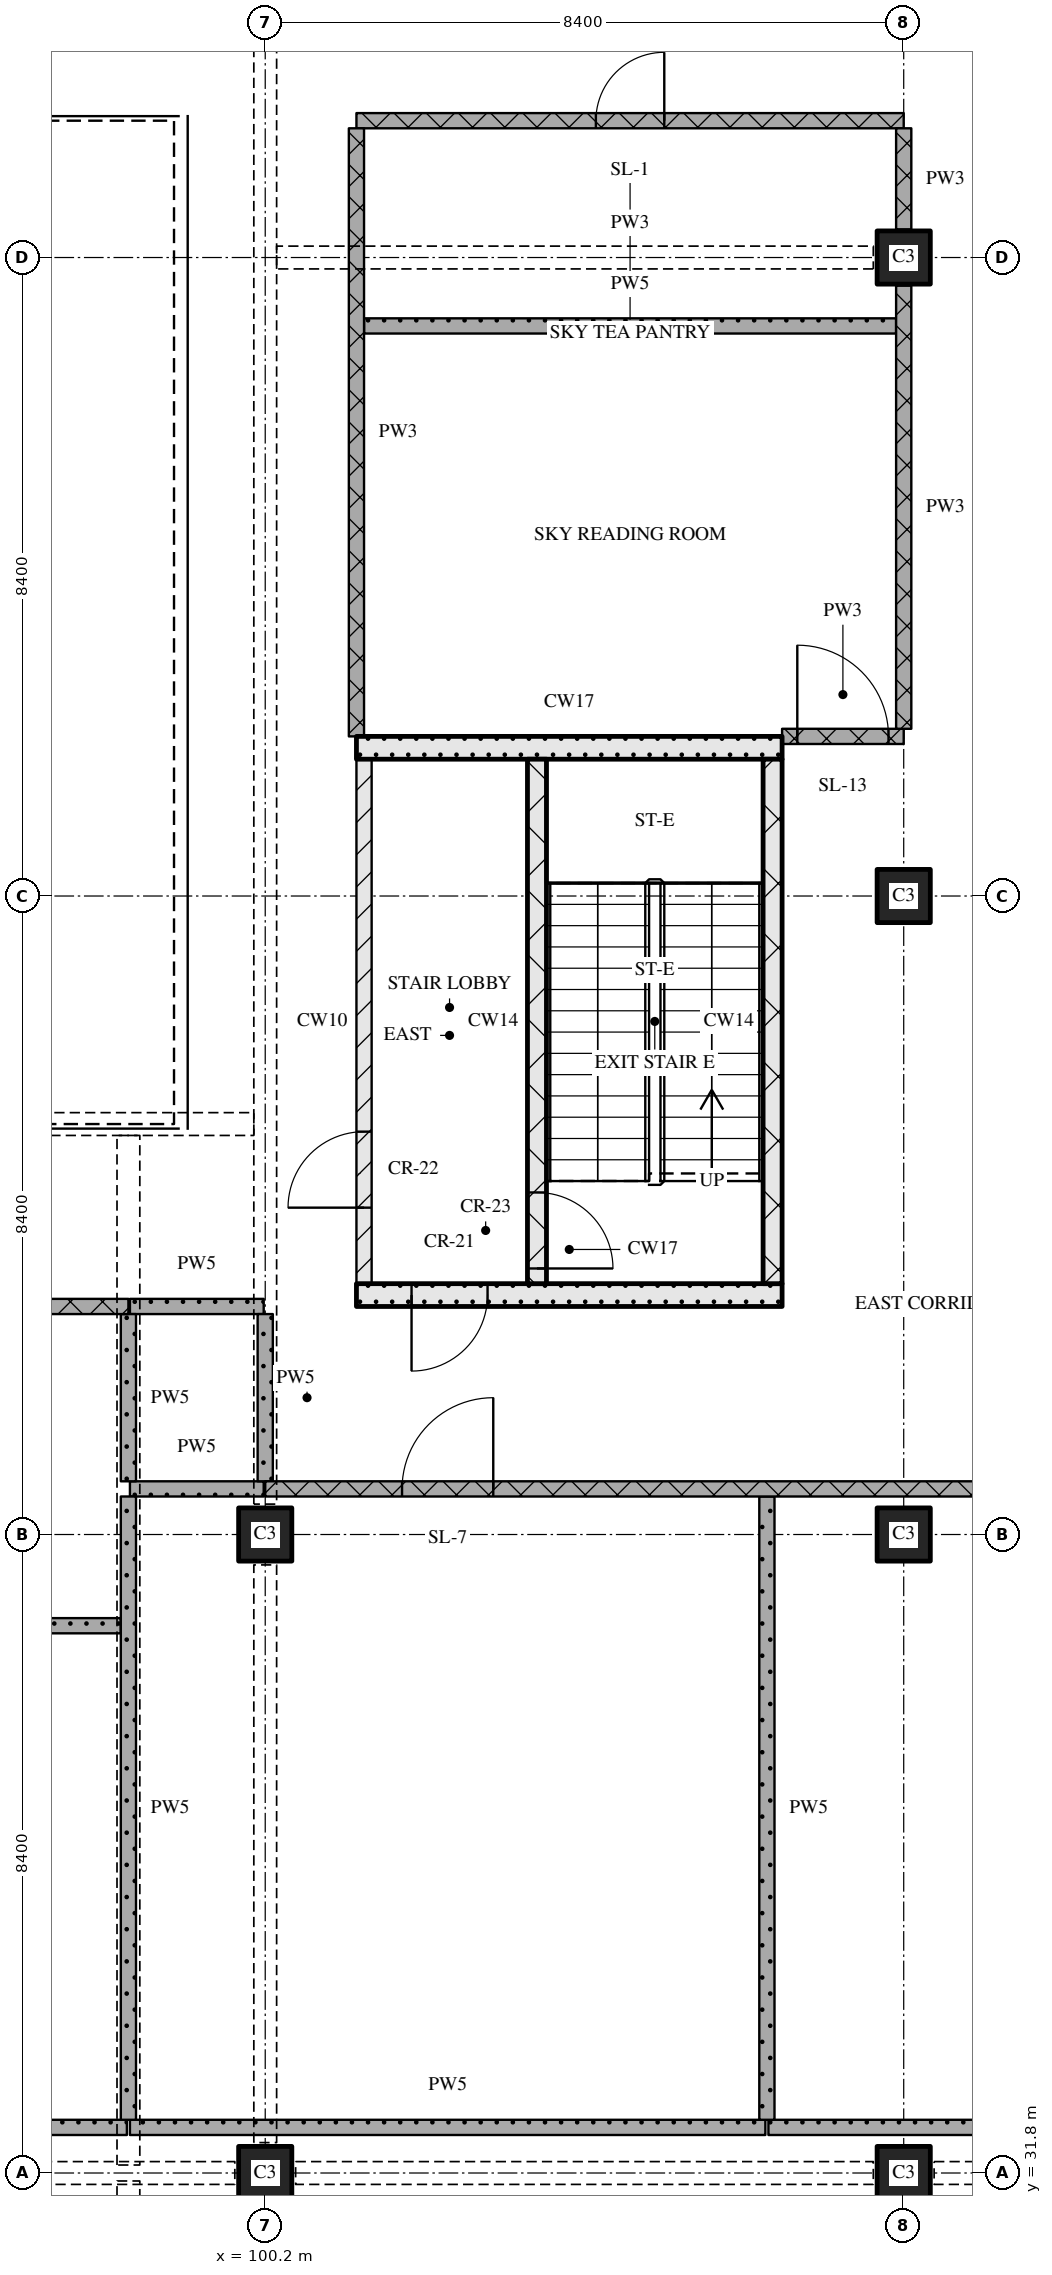
"""IFC4 building model, lengths in metres.
Left out: names, types, materials, properties, quantities, classifications, styles, units other than length and angle.
Written with IfcOpenShell. Run it as: python <this file> out.ifc"""

import sys

from ifc_helpers import new_model, si_unit, direction, frame, frame_2d, origin, origin_2d, place, context, subcontext, project, spatial, rectangle, extrude, element, fill, save


model = new_model("IFC4")
c1 = context("Model", 3, precision=1e-05, world=origin(), true_north=direction((0.0, 1.0)))
c2 = subcontext(c1, "Body", "Model", "MODEL_VIEW")
j1 = project(units=[si_unit("LENGTHUNIT", "METRE"), si_unit("PLANEANGLEUNIT", "RADIAN")], contexts=[c1])
p1 = place(None, origin())
s1 = spatial("IfcSite", under=j1, at=p1, CompositionType="ELEMENT")
p2 = place(p1, origin())
s2 = spatial("IfcBuilding", under=s1, at=p2, CompositionType="ELEMENT")
p3 = place(p2, frame((0.0, 0.0, 142.05)))
s3 = spatial("IfcBuildingStorey", under=s2, at=p3, CompositionType="ELEMENT", Elevation=142.05)
for number, where, z_axis, x_axis in (
    (1, (100.2, 31.8, 0.0), (0.0, 0.0, 1.0), (1.0, 0.0, 0.0)),
    (2, (100.2, 40.2, 0.0), (0.0, 0.0, 1.0), (1.0, 0.0, 0.0)),
    (3, (108.6, 31.8, 0.0), (0.0, 0.0, 1.0), (1.0, 0.0, 0.0)),
    (4, (108.6, 40.2, 0.0), (0.0, 0.0, 1.0), (1.0, 0.0, 0.0)),
    (5, (108.6, 48.6, 0.0), (0.0, 0.0, 1.0), (1.0, 0.0, 0.0)),
    (6, (108.6, 57.0, 0.0), (0.0, 0.0, 1.0), (1.0, 0.0, 0.0)),
):
    element("IfcColumn", number, at=place(p3, frame(where, z_axis=z_axis, x_axis=x_axis)), inside=s3, PredefinedType="COLUMN", context=c2, shape_type="SweptSolid", body=[
        extrude(rectangle(XDim=0.7, YDim=0.7, at=origin_2d()), origin(), (0.0, 0.0, 1.0), 5.4),
    ])
p4 = place(p3, frame((101.4, 43.35, 0.0), z_axis=(0.0, 0.0, 1.0), x_axis=(1.0, 0.0, 0.0)))
e7 = element("IfcWall", 7, at=p4, inside=s3, PredefinedType="SOLIDWALL", context=c2, shape_type="SweptSolid", body=[
    extrude(rectangle(XDim=5.6, YDim=0.3, at=frame_2d((2.8, 0.0))), origin(), (0.0, 0.0, 1.0), 5.12),
])
p5 = place(p4, frame((0.725, 0.0, 0.0)))
e8 = element("IfcOpeningElement", 8, at=p5, cuts=e7, PredefinedType="OPENING", context=c2, shape_type="SweptSolid", body=[
    extrude(rectangle(XDim=1.0, YDim=2.1, at=frame_2d((0.5, 1.05))), frame((0.0, 0.16, 0.0), z_axis=(0.0, -1.0, 0.0), x_axis=(1.0, 0.0, 0.0)), (0.0, 0.0, 1.0), 0.32),
])
p6 = place(p3, frame((101.5, 43.5, 0.0), z_axis=(0.0, 0.0, 1.0), x_axis=(0.0, 1.0, 0.0)))
e9 = element("IfcWall", 9, at=p6, inside=s3, PredefinedType="PARTITIONING", context=c2, shape_type="SweptSolid", body=[
    extrude(rectangle(XDim=6.9, YDim=0.2, at=frame_2d((3.45, 0.0))), origin(), (0.0, 0.0, 1.0), 5.12),
])
p7 = place(p6, frame((1.0, 0.0, 0.0)))
e10 = element("IfcOpeningElement", 10, at=p7, cuts=e9, PredefinedType="OPENING", context=c2, shape_type="SweptSolid", body=[
    extrude(rectangle(XDim=1.0, YDim=2.1, at=frame_2d((0.5, 1.05))), frame((0.0, 0.11, 0.0), z_axis=(0.0, -1.0, 0.0), x_axis=(1.0, 0.0, 0.0)), (0.0, 0.0, 1.0), 0.22),
])
p8 = place(p3, frame((103.775, 43.5, 0.0), z_axis=(0.0, 0.0, 1.0), x_axis=(0.0, 1.0, 0.0)))
e11 = element("IfcWall", 11, at=p8, inside=s3, PredefinedType="SOLIDWALL", context=c2, shape_type="SweptSolid", body=[
    extrude(rectangle(XDim=6.9, YDim=0.25, at=frame_2d((3.45, 0.0))), origin(), (0.0, 0.0, 1.0), 5.12),
])
p9 = place(p8, frame((0.2, 0.0, 0.0)))
e12 = element("IfcOpeningElement", 12, at=p9, cuts=e11, PredefinedType="OPENING", context=c2, shape_type="SweptSolid", body=[
    extrude(rectangle(XDim=1.0, YDim=2.1, at=frame_2d((0.5, 1.05))), frame((0.0, 0.135, 0.0), z_axis=(0.0, -1.0, 0.0), x_axis=(1.0, 0.0, 0.0)), (0.0, 0.0, 1.0), 0.27),
])
p10 = place(p3, frame((106.875, 43.5, 0.0), z_axis=(0.0, 0.0, 1.0), x_axis=(0.0, 1.0, 0.0)))
e13 = element("IfcWall", 13, at=p10, inside=s3, PredefinedType="SOLIDWALL", context=c2, shape_type="SweptSolid", body=[
    extrude(rectangle(XDim=6.9, YDim=0.25, at=frame_2d((3.45, 0.0))), origin(), (0.0, 0.0, 1.0), 5.12),
])
p11 = place(p3, frame((101.4, 50.55, 0.0), z_axis=(0.0, 0.0, 1.0), x_axis=(1.0, 0.0, 0.0)))
e14 = element("IfcWall", 14, at=p11, inside=s3, PredefinedType="SOLIDWALL", context=c2, shape_type="SweptSolid", body=[
    extrude(rectangle(XDim=5.6, YDim=0.3, at=frame_2d((2.8, 0.0))), origin(), (0.0, 0.0, 1.0), 5.12),
])
p12 = place(p3, frame((94.8, 32.4, 0.0), z_axis=(0.0, 0.0, 1.0), x_axis=(1.0, 0.0, 0.0)))
e15 = element("IfcWall", 15, at=p12, inside=s3, PredefinedType="PARTITIONING", context=c2, shape_type="SweptSolid", body=[
    extrude(rectangle(XDim=3.58, YDim=0.2, at=frame_2d((1.79, 0.0))), origin(), (0.0, 0.0, 1.0), 5.12),
])
p13 = place(p3, frame((98.42, 32.4, 0.0), z_axis=(0.0, 0.0, 1.0), x_axis=(1.0, 0.0, 0.0)))
e16 = element("IfcWall", 16, at=p13, inside=s3, PredefinedType="PARTITIONING", context=c2, shape_type="SweptSolid", body=[
    extrude(rectangle(XDim=8.36, YDim=0.2, at=frame_2d((4.18, 0.0))), origin(), (0.0, 0.0, 1.0), 5.12),
])
p14 = place(p3, frame((106.82, 32.4, 0.0), z_axis=(0.0, 0.0, 1.0), x_axis=(1.0, 0.0, 0.0)))
e17 = element("IfcWall", 17, at=p14, inside=s3, PredefinedType="PARTITIONING", context=c2, shape_type="SweptSolid", body=[
    extrude(rectangle(XDim=9.26, YDim=0.2, at=frame_2d((4.63, 0.0))), origin(), (0.0, 0.0, 1.0), 5.12),
])
p15 = place(p3, frame((98.3, 39.0, 0.0), z_axis=(0.0, 0.0, 1.0), x_axis=(-1.0, 0.0, 0.0)))
e18 = element("IfcWall", 18, at=p15, inside=s3, PredefinedType="PARTITIONING", context=c2, shape_type="SweptSolid", body=[
    extrude(rectangle(XDim=20.8, YDim=0.2, at=frame_2d((10.4, 0.0))), origin(), (0.0, 0.0, 1.0), 5.12),
])
p16 = place(p15, frame((9.8, 0.0, 0.0)))
e19 = element("IfcOpeningElement", 19, at=p16, cuts=e18, PredefinedType="OPENING", context=c2, shape_type="SweptSolid", body=[
    extrude(rectangle(XDim=1.2, YDim=2.1, at=frame_2d((0.6, 1.05))), frame((0.0, 0.11, 0.0), z_axis=(0.0, -1.0, 0.0), x_axis=(1.0, 0.0, 0.0)), (0.0, 0.0, 1.0), 0.22),
])
p17 = place(p3, frame((123.948, 40.8, 0.0), z_axis=(0.0, 0.0, 1.0), x_axis=(-1.0, 0.0, 0.0)))
e20 = element("IfcWall", 20, at=p17, inside=s3, PredefinedType="PARTITIONING", context=c2, shape_type="SweptSolid", body=[
    extrude(rectangle(XDim=23.749, YDim=0.2, at=frame_2d((11.874, 0.0))), origin(), (0.0, 0.0, 1.0), 5.12),
])
p18 = place(p17, frame((4.098, 0.0, 0.0)))
e21 = element("IfcOpeningElement", 21, at=p18, cuts=e20, PredefinedType="OPENING", context=c2, shape_type="SweptSolid", body=[
    extrude(rectangle(XDim=1.2, YDim=2.1, at=frame_2d((0.6, 1.05))), frame((0.0, 0.11, 0.0), z_axis=(0.0, -1.0, 0.0), x_axis=(1.0, 0.0, 0.0)), (0.0, 0.0, 1.0), 0.22),
])
p19 = place(p17, frame((11.497, 0.0, 0.0)))
e22 = element("IfcOpeningElement", 22, at=p19, cuts=e20, PredefinedType="OPENING", context=c2, shape_type="SweptSolid", body=[
    extrude(rectangle(XDim=1.2, YDim=2.1, at=frame_2d((0.6, 1.05))), frame((0.0, 0.11, 0.0), z_axis=(0.0, -1.0, 0.0), x_axis=(1.0, 0.0, 0.0)), (0.0, 0.0, 1.0), 0.22),
])
p20 = place(p17, frame((20.749, 0.0, 0.0)))
e23 = element("IfcOpeningElement", 23, at=p20, cuts=e20, PredefinedType="OPENING", context=c2, shape_type="SweptSolid", body=[
    extrude(rectangle(XDim=1.2, YDim=2.1, at=frame_2d((0.6, 1.05))), frame((0.0, 0.11, 0.0), z_axis=(0.0, -1.0, 0.0), x_axis=(1.0, 0.0, 0.0)), (0.0, 0.0, 1.0), 0.22),
])
p21 = place(p3, frame((98.42, 40.8, 0.0), z_axis=(0.0, 0.0, 1.0), x_axis=(1.0, 0.0, 0.0)))
e24 = element("IfcWall", 24, at=p21, inside=s3, PredefinedType="PARTITIONING", context=c2, shape_type="SweptSolid", body=[
    extrude(rectangle(XDim=1.76, YDim=0.2, at=frame_2d((0.88, 0.0))), origin(), (0.0, 0.0, 1.0), 5.12),
])
p22 = place(p3, frame((98.4, 43.2, 0.0), z_axis=(0.0, 0.0, 1.0), x_axis=(-1.0, 0.0, 0.0)))
e25 = element("IfcWall", 25, at=p22, inside=s3, PredefinedType="PARTITIONING", context=c2, shape_type="SweptSolid", body=[
    extrude(rectangle(XDim=21.0, YDim=0.2, at=frame_2d((10.5, 0.0))), origin(), (0.0, 0.0, 1.0), 5.12),
])
p23 = place(p22, frame((10.0, 0.0, 0.0)))
e26 = element("IfcOpeningElement", 26, at=p23, cuts=e25, PredefinedType="OPENING", context=c2, shape_type="SweptSolid", body=[
    extrude(rectangle(XDim=1.0, YDim=2.1, at=frame_2d((0.5, 1.05))), frame((0.0, 0.11, 0.0), z_axis=(0.0, -1.0, 0.0), x_axis=(1.0, 0.0, 0.0)), (0.0, 0.0, 1.0), 0.22),
])
p24 = place(p3, frame((98.42, 43.2, 0.0), z_axis=(0.0, 0.0, 1.0), x_axis=(1.0, 0.0, 0.0)))
e27 = element("IfcWall", 27, at=p24, inside=s3, PredefinedType="PARTITIONING", context=c2, shape_type="SweptSolid", body=[
    extrude(rectangle(XDim=1.76, YDim=0.2, at=frame_2d((0.88, 0.0))), origin(), (0.0, 0.0, 1.0), 5.12),
])
p25 = place(p3, frame((107.0, 50.7, 0.0), z_axis=(0.0, 0.0, 1.0), x_axis=(1.0, 0.0, 0.0)))
e28 = element("IfcWall", 28, at=p25, inside=s3, PredefinedType="PARTITIONING", context=c2, shape_type="SweptSolid", body=[
    extrude(rectangle(XDim=1.6, YDim=0.2, at=frame_2d((0.8, 0.0))), origin(), (0.0, 0.0, 1.0), 5.12),
])
p26 = place(p25, frame((0.2, 0.0, 0.0)))
e29 = element("IfcOpeningElement", 29, at=p26, cuts=e28, PredefinedType="OPENING", context=c2, shape_type="SweptSolid", body=[
    extrude(rectangle(XDim=1.2, YDim=2.1, at=frame_2d((0.6, 1.05))), frame((0.0, 0.11, 0.0), z_axis=(0.0, -1.0, 0.0), x_axis=(1.0, 0.0, 0.0)), (0.0, 0.0, 1.0), 0.22),
])
p27 = place(p3, frame((101.5, 56.1, 0.0), z_axis=(0.0, 0.0, 1.0), x_axis=(1.0, 0.0, 0.0)))
e30 = element("IfcWall", 30, at=p27, inside=s3, PredefinedType="PARTITIONING", context=c2, shape_type="SweptSolid", body=[
    extrude(rectangle(XDim=7.0, YDim=0.2, at=frame_2d((3.5, 0.0))), origin(), (0.0, 0.0, 1.0), 5.12),
])
p28 = place(p3, frame((108.6, 58.8, 0.0), z_axis=(0.0, 0.0, 1.0), x_axis=(-1.0, 0.0, 0.0)))
e31 = element("IfcWall", 31, at=p28, inside=s3, PredefinedType="PARTITIONING", context=c2, shape_type="SweptSolid", body=[
    extrude(rectangle(XDim=7.2, YDim=0.2, at=frame_2d((3.6, 0.0))), origin(), (0.0, 0.0, 1.0), 5.12),
])
p29 = place(p28, frame((3.15, 0.0, 0.0)))
e32 = element("IfcOpeningElement", 32, at=p29, cuts=e31, PredefinedType="OPENING", context=c2, shape_type="SweptSolid", body=[
    extrude(rectangle(XDim=0.9, YDim=2.1, at=frame_2d((0.45, 1.05))), frame((0.0, 0.11, 0.0), z_axis=(0.0, -1.0, 0.0), x_axis=(1.0, 0.0, 0.0)), (0.0, 0.0, 1.0), 0.22),
])
p30 = place(p3, frame((98.4, 43.1, 0.0), z_axis=(0.0, 0.0, 1.0), x_axis=(0.0, -1.0, 0.0)))
e33 = element("IfcWall", 33, at=p30, inside=s3, PredefinedType="PARTITIONING", context=c2, shape_type="SweptSolid", body=[
    extrude(rectangle(XDim=2.2, YDim=0.2, at=frame_2d((1.1, 0.0))), origin(), (0.0, 0.0, 1.0), 5.12),
])
p31 = place(p3, frame((98.4, 40.7, 0.0), z_axis=(0.0, 0.0, 1.0), x_axis=(0.0, -1.0, 0.0)))
e34 = element("IfcWall", 34, at=p31, inside=s3, PredefinedType="PARTITIONING", context=c2, shape_type="SweptSolid", body=[
    extrude(rectangle(XDim=8.2, YDim=0.2, at=frame_2d((4.1, 0.0))), origin(), (0.0, 0.0, 1.0), 5.12),
])
p32 = place(p3, frame((100.2, 43.1, 0.0), z_axis=(0.0, 0.0, 1.0), x_axis=(0.0, -1.0, 0.0)))
e35 = element("IfcWall", 35, at=p32, inside=s3, PredefinedType="PARTITIONING", context=c2, shape_type="SweptSolid", body=[
    extrude(rectangle(XDim=2.2, YDim=0.2, at=frame_2d((1.1, 0.0))), origin(), (0.0, 0.0, 1.0), 4.23),
])
p33 = place(p3, frame((101.4, 58.7, 0.0), z_axis=(0.0, 0.0, 1.0), x_axis=(0.0, -1.0, 0.0)))
e36 = element("IfcWall", 36, at=p33, inside=s3, PredefinedType="PARTITIONING", context=c2, shape_type="SweptSolid", body=[
    extrude(rectangle(XDim=8.0, YDim=0.2, at=frame_2d((4.0, 0.0))), origin(), (0.0, 0.0, 1.0), 5.12),
])
p34 = place(p3, frame((106.8, 40.7, 0.0), z_axis=(0.0, 0.0, 1.0), x_axis=(0.0, -1.0, 0.0)))
e37 = element("IfcWall", 37, at=p34, inside=s3, PredefinedType="PARTITIONING", context=c2, shape_type="SweptSolid", body=[
    extrude(rectangle(XDim=8.2, YDim=0.2, at=frame_2d((4.1, 0.0))), origin(), (0.0, 0.0, 1.0), 5.12),
])
p35 = place(p3, frame((108.6, 56.63, 0.0), z_axis=(0.0, 0.0, 1.0), x_axis=(0.0, -1.0, 0.0)))
e38 = element("IfcWall", 38, at=p35, inside=s3, PredefinedType="PARTITIONING", context=c2, shape_type="SweptSolid", body=[
    extrude(rectangle(XDim=5.83, YDim=0.2, at=frame_2d((2.915, 0.0))), origin(), (0.0, 0.0, 1.0), 5.12),
])
p36 = place(p3, frame((108.6, 58.7, 0.0), z_axis=(0.0, 0.0, 1.0), x_axis=(0.0, -1.0, 0.0)))
e39 = element("IfcWall", 39, at=p36, inside=s3, PredefinedType="PARTITIONING", context=c2, shape_type="SweptSolid", body=[
    extrude(rectangle(XDim=1.33, YDim=0.2, at=frame_2d((0.665, 0.0))), origin(), (0.0, 0.0, 1.0), 5.12),
])
p37 = place(p5, origin())
e40 = element("IfcDoor", 40, at=p37, inside=s3, OperationType="SINGLE_SWING_RIGHT", PredefinedType="DOOR", context=c2, shape_type="SweptSolid", body=[
    extrude(rectangle(XDim=1.0, YDim=2.1, at=frame_2d((0.5, 1.05))), frame((0.0, 0.025, 0.0), z_axis=(0.0, -1.0, 0.0), x_axis=(1.0, 0.0, 0.0)), (0.0, 0.0, 1.0), 0.05),
])
fill(e8, e40)
p38 = place(p9, origin())
e41 = element("IfcDoor", 41, at=p38, inside=s3, OperationType="SINGLE_SWING_RIGHT", PredefinedType="DOOR", context=c2, shape_type="SweptSolid", body=[
    extrude(rectangle(XDim=1.0, YDim=2.1, at=frame_2d((0.5, 1.05))), frame((0.0, 0.025, 0.0), z_axis=(0.0, -1.0, 0.0), x_axis=(1.0, 0.0, 0.0)), (0.0, 0.0, 1.0), 0.05),
])
fill(e12, e41)
p39 = place(p7, origin())
e42 = element("IfcDoor", 42, at=p39, inside=s3, OperationType="SINGLE_SWING_LEFT", PredefinedType="DOOR", context=c2, shape_type="SweptSolid", body=[
    extrude(rectangle(XDim=1.0, YDim=2.1, at=frame_2d((0.5, 1.05))), frame((0.0, 0.025, 0.0), z_axis=(0.0, -1.0, 0.0), x_axis=(1.0, 0.0, 0.0)), (0.0, 0.0, 1.0), 0.05),
])
fill(e10, e42)
p40 = place(p20, origin())
e43 = element("IfcDoor", 43, at=p40, inside=s3, OperationType="SINGLE_SWING_RIGHT", PredefinedType="DOOR", context=c2, shape_type="SweptSolid", body=[
    extrude(rectangle(XDim=1.2, YDim=2.1, at=frame_2d((0.6, 1.05))), frame((0.0, 0.025, 0.0), z_axis=(0.0, -1.0, 0.0), x_axis=(1.0, 0.0, 0.0)), (0.0, 0.0, 1.0), 0.05),
])
fill(e23, e43)
p41 = place(p26, origin())
e44 = element("IfcDoor", 44, at=p41, inside=s3, OperationType="SINGLE_SWING_LEFT", PredefinedType="DOOR", context=c2, shape_type="SweptSolid", body=[
    extrude(rectangle(XDim=1.2, YDim=2.1, at=frame_2d((0.6, 1.05))), frame((0.0, 0.025, 0.0), z_axis=(0.0, -1.0, 0.0), x_axis=(1.0, 0.0, 0.0)), (0.0, 0.0, 1.0), 0.05),
])
fill(e29, e44)
p42 = place(p29, origin())
e45 = element("IfcDoor", 45, at=p42, inside=s3, OperationType="SINGLE_SWING_RIGHT", PredefinedType="DOOR", context=c2, shape_type="SweptSolid", body=[
    extrude(rectangle(XDim=0.9, YDim=2.1, at=frame_2d((0.45, 1.05))), frame((0.0, 0.025, 0.0), z_axis=(0.0, -1.0, 0.0), x_axis=(1.0, 0.0, 0.0)), (0.0, 0.0, 1.0), 0.05),
])
fill(e32, e45)
save(model, sys.argv[1])
